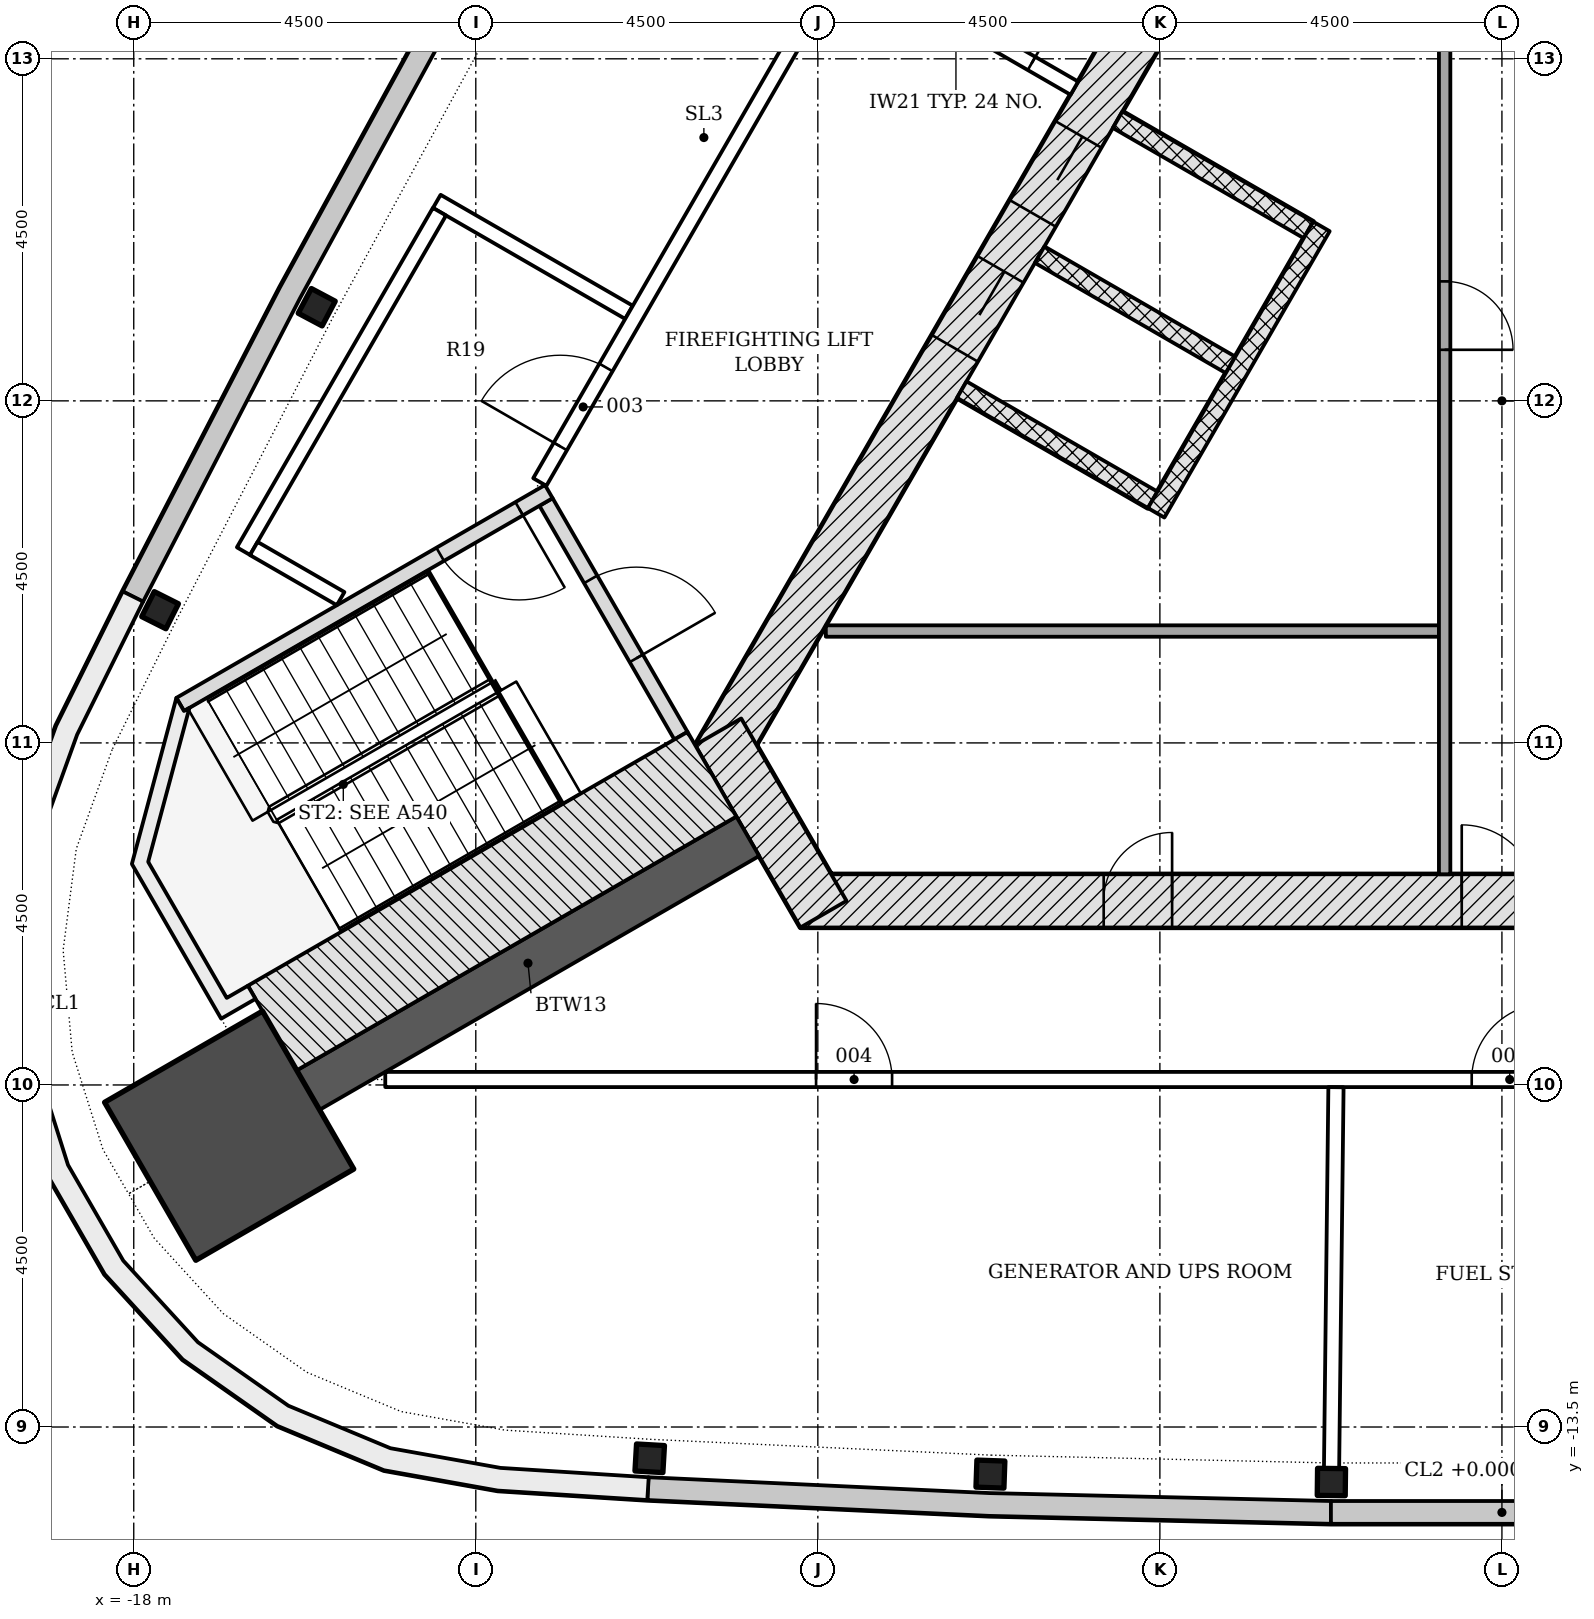
"""IFC4 building model, lengths in metres.
Left out: names, types, materials, properties, quantities, classifications, styles, units other than length and angle.
Written with IfcOpenShell. Run it as: python <this file> out.ifc"""

import sys

from ifc_helpers import new_model, si_unit, direction, frame, frame_2d, origin, origin_2d, place, context, subcontext, project, spatial, polyline, rectangle, i_section, outline, extrude, element, fill, save


model = new_model("IFC4")
c1 = context("Model", 3, precision=1e-05, world=origin(), true_north=direction((0.0, 1.0)))
c2 = subcontext(c1, "Body", "Model", "MODEL_VIEW")
j1 = project(units=[si_unit("LENGTHUNIT", "METRE"), si_unit("PLANEANGLEUNIT", "RADIAN")], contexts=[c1])
p1 = place(None, origin())
s1 = spatial("IfcSite", under=j1, at=p1, CompositionType="ELEMENT")
p2 = place(p1, origin())
s2 = spatial("IfcBuilding", under=s1, at=p2, CompositionType="ELEMENT")
p3 = place(p2, frame((0.0, 0.0, 293.1)))
s3 = spatial("IfcBuildingStorey", under=s2, at=p3, CompositionType="ELEMENT", Elevation=293.1)
p4 = place(p3, frame((-9.229, -6.578, -0.25), z_axis=(0.0, 0.0, 1.0), x_axis=(1.0, 0.0, 0.0)))
e1 = element("IfcWall", 1, at=p4, inside=s3, PredefinedType="SHEAR", context=c2, shape_type="SweptSolid", body=[
    extrude(rectangle(XDim=18.458, YDim=0.7, at=frame_2d((9.229, 0.0))), origin(), (0.0, 0.0, 1.0), 4.5),
])
p5 = place(p4, frame((8.7, 0.0, 0.25)))
e2 = element("IfcOpeningElement", 2, at=p5, cuts=e1, PredefinedType="OPENING", context=c2, shape_type="SweptSolid", body=[
    extrude(rectangle(XDim=1.0, YDim=2.1, at=frame_2d((0.5, 1.05))), frame((0.0, 0.36, 0.0), z_axis=(0.0, -1.0, 0.0), x_axis=(1.0, 0.0, 0.0)), (0.0, 0.0, 1.0), 0.72),
])
p6 = place(p4, frame((3.99, 0.0, 0.25)))
e3 = element("IfcOpeningElement", 3, at=p6, cuts=e1, PredefinedType="OPENING", context=c2, shape_type="SweptSolid", body=[
    extrude(rectangle(XDim=0.9, YDim=2.1, at=frame_2d((0.45, 1.05))), frame((0.0, 0.36, 0.0), z_axis=(0.0, -1.0, 0.0), x_axis=(1.0, 0.0, 0.0)), (0.0, 0.0, 1.0), 0.72),
])
p7 = place(p4, frame((13.539, 0.0, 0.25)))
e4 = element("IfcOpeningElement", 4, at=p7, cuts=e1, PredefinedType="OPENING", context=c2, shape_type="SweptSolid", body=[
    extrude(rectangle(XDim=0.9, YDim=2.1, at=frame_2d((0.45, 1.05))), frame((0.0, 0.36, 0.0), z_axis=(0.0, -1.0, 0.0), x_axis=(1.0, 0.0, 0.0)), (0.0, 0.0, 1.0), 0.72),
])
p8 = place(p3, frame((-1.083, 11.281, -0.25), z_axis=(0.0, 0.0, 1.0), x_axis=(-0.500001446645, -0.866024568562, 0.0)))
e5 = element("IfcWall", 5, at=p8, inside=s3, PredefinedType="SHEAR", context=c2, shape_type="SweptSolid", body=[
    extrude(rectangle(XDim=18.458, YDim=0.7, at=frame_2d((9.229, 0.0))), origin(), (0.0, 0.0, 1.0), 4.5),
])
p9 = place(p8, frame((8.979, 0.0, 0.25)))
e6 = element("IfcOpeningElement", 6, at=p9, cuts=e5, PredefinedType="OPENING", context=c2, shape_type="SweptSolid", body=[
    extrude(rectangle(XDim=1.2, YDim=2.1, at=frame_2d((0.6, 1.05))), frame((0.0, 0.36, 0.0), z_axis=(0.0, -1.0, 0.0), x_axis=(1.0, 0.0, 0.0)), (0.0, 0.0, 1.0), 0.72),
])
p10 = place(p8, frame((11.029, 0.0, 0.25)))
e7 = element("IfcOpeningElement", 7, at=p10, cuts=e5, PredefinedType="OPENING", context=c2, shape_type="SweptSolid", body=[
    extrude(rectangle(XDim=1.2, YDim=2.1, at=frame_2d((0.6, 1.05))), frame((0.0, 0.36, 0.0), z_axis=(0.0, -1.0, 0.0), x_axis=(1.0, 0.0, 0.0)), (0.0, 0.0, 1.0), 0.72),
])
p11 = place(p3, frame((-10.311, -4.353, -0.25), z_axis=(0.0, 0.0, 1.0), x_axis=(0.500042739161, -0.866000726912, 0.0)))
e8 = element("IfcWall", 8, at=p11, inside=s3, PredefinedType="SHEAR", context=c2, shape_type="SweptSolid", body=[
    extrude(rectangle(XDim=2.771, YDim=0.7, at=frame_2d((1.386, 0.0))), origin(), (0.0, 0.0, 1.0), 4.5),
])
p12 = place(p3, frame((-9.922, -5.728, -0.25), z_axis=(0.0, 0.0, 1.0), x_axis=(-0.866032176823, -0.499988268569, 0.0)))
e9 = element("IfcWall", 9, at=p12, inside=s3, PredefinedType="SHEAR", context=c2, shape_type="SweptSolid", body=[
    extrude(rectangle(XDim=6.678, YDim=0.6, at=frame_2d((3.339, 0.0))), origin(), (0.0, 0.0, 1.0), 4.5),
])
p13 = place(p3, frame((-16.745, -9.667, -0.25), z_axis=(0.0, 0.0, 1.0), x_axis=(-0.866025403784, -0.5, 0.0)))
e10 = element("IfcColumn", 10, at=p13, inside=s3, PredefinedType="COLUMN", context=c2, shape_type="SweptSolid", body=[
    extrude(rectangle(XDim=2.4, YDim=2.4, at=origin_2d()), origin(), (0.0, 0.0, 1.0), 4.5),
])
for number, where, z_axis, x_axis in (
    (11, (-15.593, 1.232, -0.25), (0.0, 0.0, 1.0), (-0.47, -0.883, 0.0)),
    (12, (-17.654, -2.754, -0.25), (0.0, 0.0, 1.0), (-0.449, -0.894, 0.0)),
    (13, (-11.212, -13.911, -0.25), (0.0, 0.0, 1.0), (0.998, -0.058, 0.0)),
    (14, (-6.729, -14.119, -0.25), (0.0, 0.0, 1.0), (0.999, -0.035, 0.0)),
    (15, (-2.244, -14.224, -0.25), (0.0, 0.0, 1.0), (1.0, -0.012, 0.0)),
):
    element("IfcColumn", number, at=place(p3, frame(where, z_axis=z_axis, x_axis=x_axis)), inside=s3, PredefinedType="COLUMN", context=c2, shape_type="SweptSolid", body=[
        extrude(i_section(OverallWidth=0.368, OverallDepth=0.356, WebThickness=0.011, FlangeThickness=0.018, FilletRadius=0.015, at=origin_2d()), origin(), (0.0, 0.0, 1.0), 4.5),
    ])
p14 = place(p3, origin())
e16 = element("IfcWall", 16, at=p14, inside=s3, PredefinedType="NOTDEFINED", context=c2, shape_type="SweptSolid", body=[
    extrude(outline(polyline([(-13.919, 5.438), (-16.078, 1.49), (-18.145, -2.507), (-17.878, -2.645), (-15.813, 1.349), (-13.656, 5.294), (-13.919, 5.438)])), origin(), (0.0, 0.0, 1.0), 4.25),
])
p15 = place(p3, origin())
e17 = element("IfcWall", 17, at=p15, inside=s3, PredefinedType="NOTDEFINED", context=c2, shape_type="SweptSolid", body=[
    extrude(outline(polyline([(-11.244, -14.46), (-6.749, -14.669), (-2.25, -14.773), (-2.243, -14.474), (-6.738, -14.369), (-11.23, -14.161), (-11.244, -14.46)])), origin(), (0.0, 0.0, 1.0), 4.25),
])
p16 = place(p3, origin())
e18 = element("IfcWall", 18, at=p16, inside=s3, PredefinedType="NOTDEFINED", context=c2, shape_type="SweptSolid", body=[
    extrude(outline(polyline([(-2.25, -14.773), (2.25, -14.773), (2.25, -14.473), (-2.25, -14.473), (-2.25, -14.773)])), origin(), (0.0, 0.0, 1.0), 1.2),
])
p17 = place(p3, origin())
e19 = element("IfcWall", 19, at=p17, inside=s3, PredefinedType="NOTDEFINED", context=c2, shape_type="SweptSolid", body=[
    extrude(outline(polyline([(-18.145, -2.507), (-19.021, -4.273), (-19.538, -5.703), (-19.733, -7.21), (-19.599, -8.724), (-19.141, -10.174), (-18.381, -11.49), (-17.355, -12.611), (-16.111, -13.485), (-14.708, -14.069), (-13.211, -14.336), (-11.244, -14.46), (-11.225, -14.161), (-13.176, -14.038), (-14.623, -13.779), (-15.965, -13.22), (-17.156, -12.385), (-18.138, -11.312), (-18.865, -10.052), (-19.303, -8.665), (-19.432, -7.216), (-19.244, -5.774), (-18.745, -4.391), (-17.876, -2.64), (-18.145, -2.507)])), origin(), (0.0, 0.0, 1.0), 4.25),
])
for number, where, z_axis, x_axis in (
    (20, (-5.056, 3.699, -0.25), (0.0, 0.0, 1.0), (0.866, -0.5, 0.0)),
    (21, (-6.081, 1.923, -0.25), (0.0, 0.0, 1.0), (0.866, -0.5, 0.0)),
    (22, (-7.106, 0.148, -0.25), (0.0, 0.0, 1.0), (0.866, -0.5, 0.0)),
):
    element("IfcWall", number, at=place(p3, frame(where, z_axis=z_axis, x_axis=x_axis)), inside=s3, PredefinedType="PARTITIONING", context=c2, shape_type="SweptSolid", body=[
        extrude(rectangle(XDim=2.9, YDim=0.25, at=frame_2d((1.45, 0.0))), origin(), (0.0, 0.0, 1.0), 4.5),
    ])
p18 = place(p3, frame((-2.374, 2.294, 0.0), z_axis=(0.0, 0.0, 1.0), x_axis=(-0.499996127374, -0.866027639635, 0.0)))
e23 = element("IfcWall", 23, at=p18, inside=s3, PredefinedType="PARTITIONING", context=c2, shape_type="SweptSolid", body=[
    extrude(rectangle(XDim=4.35, YDim=0.25, at=frame_2d((2.175, 0.0))), origin(), (0.0, 0.0, 1.0), 4.25),
])
p19 = place(p3, frame((-8.895, -3.028, 0.0), z_axis=(0.0, 0.0, 1.0), x_axis=(1.0, 0.0, 0.0)))
e24 = element("IfcWall", 24, at=p19, inside=s3, PredefinedType="PARTITIONING", context=c2, shape_type="SweptSolid", body=[
    extrude(rectangle(XDim=8.066, YDim=0.15, at=frame_2d((4.033, 0.0))), origin(), (0.0, 0.0, 1.0), 4.25),
])
p20 = place(p3, frame((-0.754, 10.756, 0.0), z_axis=(0.0, 0.0, 1.0), x_axis=(0.0, -1.0, 0.0)))
e25 = element("IfcWall", 25, at=p20, inside=s3, PredefinedType="PARTITIONING", context=c2, shape_type="SweptSolid", body=[
    extrude(rectangle(XDim=16.985, YDim=0.15, at=frame_2d((8.492, 0.0))), origin(), (0.0, 0.0, 1.0), 4.25),
])
p21 = place(p20, frame((9.185, 0.0, 0.0)))
e26 = element("IfcOpeningElement", 26, at=p21, cuts=e25, PredefinedType="OPENING", context=c2, shape_type="SweptSolid", body=[
    extrude(rectangle(XDim=0.9, YDim=2.1, at=frame_2d((0.45, 1.05))), frame((0.0, 0.085, 0.0), z_axis=(0.0, -1.0, 0.0), x_axis=(1.0, 0.0, 0.0)), (0.0, 0.0, 1.0), 0.17),
])
p22 = place(p3, frame((-12.576, -1.331, -0.25), z_axis=(0.0, 0.0, 1.0), x_axis=(0.499970499736, -0.8660424351, 0.0)))
e27 = element("IfcWall", 27, at=p22, inside=s3, PredefinedType="SHEAR", context=c2, shape_type="SweptSolid", body=[
    extrude(rectangle(XDim=3.55, YDim=0.2, at=frame_2d((1.775, 0.0))), origin(), (0.0, 0.0, 1.0), 4.5),
])
p23 = place(p22, frame((1.175, 0.0, 0.25)))
e28 = element("IfcOpeningElement", 28, at=p23, cuts=e27, PredefinedType="OPENING", context=c2, shape_type="SweptSolid", body=[
    extrude(rectangle(XDim=1.2, YDim=2.1, at=frame_2d((0.6, 1.05))), frame((0.0, 0.11, 0.0), z_axis=(0.0, -1.0, 0.0), x_axis=(1.0, 0.0, 0.0)), (0.0, 0.0, 1.0), 0.22),
])
p24 = place(p3, frame((-12.539, -1.194, -0.25), z_axis=(0.0, 0.0, 1.0), x_axis=(-0.866045472092, -0.499965239061, 0.0)))
e29 = element("IfcWall", 29, at=p24, inside=s3, PredefinedType="SHEAR", context=c2, shape_type="SweptSolid", body=[
    extrude(rectangle(XDim=5.6, YDim=0.2, at=frame_2d((2.8, 0.0))), origin(), (0.0, 0.0, 1.0), 4.5),
])
p25 = place(p24, frame((0.45, 0.0, 0.25)))
e30 = element("IfcOpeningElement", 30, at=p25, cuts=e29, PredefinedType="OPENING", context=c2, shape_type="SweptSolid", body=[
    extrude(rectangle(XDim=1.2, YDim=2.1, at=frame_2d((0.6, 1.05))), frame((0.0, 0.11, 0.0), z_axis=(0.0, -1.0, 0.0), x_axis=(1.0, 0.0, 0.0)), (0.0, 0.0, 1.0), 0.22),
])
p26 = place(p3, frame((-10.393, -4.912, -0.25), z_axis=(0.0, 0.0, 1.0), x_axis=(-0.866025486527, -0.499999856685, 0.0)))
e31 = element("IfcWall", 31, at=p26, inside=s3, PredefinedType="SHEAR", context=c2, shape_type="SweptSolid", body=[
    extrude(rectangle(XDim=6.679, YDim=1.286, at=frame_2d((3.339, 0.0))), origin(), (0.0, 0.0, 1.0), 4.5),
])
p27 = place(p3, frame((0.0, 0.0, -0.25)))
e32 = element("IfcWall", 32, at=p27, inside=s3, PredefinedType="SHEAR", context=c2, shape_type="SweptSolid", body=[
    extrude(outline(polyline([(-17.439, -3.907), (-18.025, -6.093), (-16.85, -8.128), (-16.398, -7.867), (-16.498, -7.694), (-16.498, -7.694), (-16.777, -7.855), (-17.81, -6.065), (-17.267, -4.039), (-17.339, -4.081), (-17.339, -4.081), (-17.339, -4.081), (-17.339, -4.081), (-17.339, -4.081), (-17.339, -4.081), (-17.339, -4.081), (-17.339, -4.081), (-17.339, -4.081), (-17.339, -4.081), (-17.339, -4.081), (-17.339, -4.081), (-17.339, -4.081), (-17.339, -4.081), (-17.339, -4.081), (-17.339, -4.081), (-17.339, -4.081), (-17.439, -3.907)])), origin(), (0.0, 0.0, 1.0), 4.5),
])
p28 = place(p3, frame((-8.741, 5.913, 0.0), z_axis=(0.0, 0.0, 1.0), x_axis=(0.866017220491, -0.500014173611, 0.0)))
e33 = element("IfcWall", 33, at=p28, inside=s3, PredefinedType="PARTITIONING", context=c2, shape_type="SweptSolid", body=[
    extrude(rectangle(XDim=3.598, YDim=0.2, at=frame_2d((1.799, 0.0))), origin(), (0.0, 0.0, 1.0), 4.25),
])
p29 = place(p28, frame((1.748, 0.0, 0.0)))
e34 = element("IfcOpeningElement", 34, at=p29, cuts=e33, PredefinedType="OPENING", context=c2, shape_type="SweptSolid", body=[
    extrude(rectangle(XDim=1.2, YDim=2.1, at=frame_2d((0.6, 1.05))), frame((0.0, 0.11, 0.0), z_axis=(0.0, -1.0, 0.0), x_axis=(1.0, 0.0, 0.0)), (0.0, 0.0, 1.0), 0.22),
])
p30 = place(p3, frame((-14.013, 2.625, 0.0), z_axis=(0.0, 0.0, 1.0), x_axis=(0.866026830048, -0.499997529631, 0.0)))
e35 = element("IfcWall", 35, at=p30, inside=s3, PredefinedType="PARTITIONING", context=c2, shape_type="SweptSolid", body=[
    extrude(rectangle(XDim=2.919, YDim=0.2, at=frame_2d((1.46, 0.0))), origin(), (0.0, 0.0, 1.0), 4.25),
])
p31 = place(p3, frame((-12.658, -1.068, 0.0), z_axis=(0.0, 0.0, 1.0), x_axis=(0.499996073327, 0.866027670838, 0.0)))
e36 = element("IfcWall", 36, at=p31, inside=s3, PredefinedType="PARTITIONING", context=c2, shape_type="SweptSolid", body=[
    extrude(rectangle(XDim=7.904, YDim=0.2, at=frame_2d((3.952, 0.0))), origin(), (0.0, 0.0, 1.0), 3.702),
])
p32 = place(p31, frame((0.541, 0.0, 0.0)))
e37 = element("IfcOpeningElement", 37, at=p32, cuts=e36, PredefinedType="OPENING", context=c2, shape_type="SweptSolid", body=[
    extrude(rectangle(XDim=1.2, YDim=2.1, at=frame_2d((0.6, 1.05))), frame((0.0, 0.11, 0.0), z_axis=(0.0, -1.0, 0.0), x_axis=(1.0, 0.0, 0.0)), (0.0, 0.0, 1.0), 0.22),
])
p33 = place(p3, frame((-16.556, -1.977, 0.0), z_axis=(0.0, 0.0, 1.0), x_axis=(0.499983365876, 0.866035007288, 0.0)))
e38 = element("IfcWall", 38, at=p33, inside=s3, PredefinedType="PARTITIONING", context=c2, shape_type="SweptSolid", body=[
    extrude(rectangle(XDim=5.157, YDim=0.2, at=frame_2d((2.579, 0.0))), origin(), (0.0, 0.0, 1.0), 3.702),
])
p34 = place(p3, frame((-16.421, -1.942, 0.0), z_axis=(0.0, 0.0, 1.0), x_axis=(0.865991484893, -0.500058744641, 0.0)))
e39 = element("IfcWall", 39, at=p34, inside=s3, PredefinedType="PARTITIONING", context=c2, shape_type="SweptSolid", body=[
    extrude(rectangle(XDim=1.32, YDim=0.2, at=frame_2d((0.66, 0.0))), origin(), (0.0, 0.0, 1.0), 4.25),
])
p35 = place(p3, frame((-14.691, -8.928, 0.0), z_axis=(0.0, 0.0, 1.0), x_axis=(1.0, 0.0, 0.0)))
e40 = element("IfcWall", 40, at=p35, inside=s3, PredefinedType="PARTITIONING", context=c2, shape_type="SweptSolid", body=[
    extrude(rectangle(XDim=19.591, YDim=0.2, at=frame_2d((9.795, 0.0))), origin(), (0.0, 0.0, 1.0), 3.702),
])
p36 = place(p35, frame((5.668, 0.0, 0.0)))
e41 = element("IfcOpeningElement", 41, at=p36, cuts=e40, PredefinedType="OPENING", context=c2, shape_type="SweptSolid", body=[
    extrude(rectangle(XDim=1.0, YDim=2.1, at=frame_2d((0.5, 1.05))), frame((0.0, 0.11, 0.0), z_axis=(0.0, -1.0, 0.0), x_axis=(1.0, 0.0, 0.0)), (0.0, 0.0, 1.0), 0.22),
])
p37 = place(p35, frame((14.293, 0.0, 0.0)))
e42 = element("IfcOpeningElement", 42, at=p37, cuts=e40, PredefinedType="OPENING", context=c2, shape_type="SweptSolid", body=[
    extrude(rectangle(XDim=1.0, YDim=2.1, at=frame_2d((0.5, 1.05))), frame((0.0, 0.11, 0.0), z_axis=(0.0, -1.0, 0.0), x_axis=(1.0, 0.0, 0.0)), (0.0, 0.0, 1.0), 0.22),
])
p38 = place(p35, frame((17.626, 0.0, 0.0)))
e43 = element("IfcOpeningElement", 43, at=p38, cuts=e40, PredefinedType="OPENING", context=c2, shape_type="SweptSolid", body=[
    extrude(rectangle(XDim=1.0, YDim=2.1, at=frame_2d((0.5, 1.05))), frame((0.0, 0.11, 0.0), z_axis=(0.0, -1.0, 0.0), x_axis=(1.0, 0.0, 0.0)), (0.0, 0.0, 1.0), 0.22),
])
p39 = place(p3, frame((-2.242, -14.073, 0.0), z_axis=(0.0, 0.0, 1.0), x_axis=(0.011566914048, 0.999933101012, 0.0)))
e44 = element("IfcWall", 44, at=p39, inside=s3, PredefinedType="PARTITIONING", context=c2, shape_type="SweptSolid", body=[
    extrude(rectangle(XDim=5.044, YDim=0.2, at=frame_2d((2.522, 0.0))), origin(), (0.0, 0.0, 1.0), 3.702),
])
p40 = place(p9, origin())
e45 = element("IfcDoor", 45, at=p40, inside=s3, OperationType="DOUBLE_DOOR_SLIDING", PredefinedType="DOOR", context=c2, shape_type="SweptSolid", body=[
    extrude(rectangle(XDim=1.2, YDim=2.1, at=frame_2d((0.6, 1.05))), frame((0.0, 0.025, 0.0), z_axis=(0.0, -1.0, 0.0), x_axis=(1.0, 0.0, 0.0)), (0.0, 0.0, 1.0), 0.05),
])
fill(e6, e45)
p41 = place(p10, origin())
e46 = element("IfcDoor", 46, at=p41, inside=s3, OperationType="DOUBLE_DOOR_SLIDING", PredefinedType="DOOR", context=c2, shape_type="SweptSolid", body=[
    extrude(rectangle(XDim=1.2, YDim=2.1, at=frame_2d((0.6, 1.05))), frame((0.0, 0.025, 0.0), z_axis=(0.0, -1.0, 0.0), x_axis=(1.0, 0.0, 0.0)), (0.0, 0.0, 1.0), 0.05),
])
fill(e7, e46)
p42 = place(p5, origin())
e47 = element("IfcDoor", 47, at=p42, inside=s3, OperationType="SINGLE_SWING_LEFT", PredefinedType="DOOR", context=c2, shape_type="SweptSolid", body=[
    extrude(rectangle(XDim=1.0, YDim=2.1, at=frame_2d((0.5, 1.05))), frame((0.0, 0.075, 0.0), z_axis=(0.0, -1.0, 0.0), x_axis=(1.0, 0.0, 0.0)), (0.0, 0.0, 1.0), 0.15),
])
fill(e2, e47)
p43 = place(p6, origin())
e48 = element("IfcDoor", 48, at=p43, inside=s3, OperationType="SINGLE_SWING_RIGHT", PredefinedType="DOOR", context=c2, shape_type="SweptSolid", body=[
    extrude(rectangle(XDim=0.9, YDim=2.1, at=frame_2d((0.45, 1.05))), frame((0.0, 0.075, 0.0), z_axis=(0.0, -1.0, 0.0), x_axis=(1.0, 0.0, 0.0)), (0.0, 0.0, 1.0), 0.15),
])
fill(e3, e48)
p44 = place(p21, origin())
e49 = element("IfcDoor", 49, at=p44, inside=s3, OperationType="SINGLE_SWING_RIGHT", PredefinedType="DOOR", context=c2, shape_type="SweptSolid", body=[
    extrude(rectangle(XDim=0.9, YDim=2.1, at=frame_2d((0.45, 1.05))), frame((0.0, 0.025, 0.0), z_axis=(0.0, -1.0, 0.0), x_axis=(1.0, 0.0, 0.0)), (0.0, 0.0, 1.0), 0.05),
])
fill(e26, e49)
p45 = place(p23, origin())
e50 = element("IfcDoor", 50, at=p45, inside=s3, OperationType="SINGLE_SWING_RIGHT", PredefinedType="DOOR", context=c2, shape_type="SweptSolid", body=[
    extrude(rectangle(XDim=1.2, YDim=2.1, at=frame_2d((0.6, 1.05))), frame((0.0, 0.025, 0.0), z_axis=(0.0, -1.0, 0.0), x_axis=(1.0, 0.0, 0.0)), (0.0, 0.0, 1.0), 0.05),
])
fill(e28, e50)
p46 = place(p25, origin())
e51 = element("IfcDoor", 51, at=p46, inside=s3, OperationType="SINGLE_SWING_LEFT", PredefinedType="DOOR", context=c2, shape_type="SweptSolid", body=[
    extrude(rectangle(XDim=1.2, YDim=2.1, at=frame_2d((0.6, 1.05))), frame((0.0, 0.025, 0.0), z_axis=(0.0, -1.0, 0.0), x_axis=(1.0, 0.0, 0.0)), (0.0, 0.0, 1.0), 0.05),
])
fill(e30, e51)
p47 = place(p29, origin())
e52 = element("IfcDoor", 52, at=p47, inside=s3, OperationType="SINGLE_SWING_RIGHT", PredefinedType="DOOR", context=c2, shape_type="SweptSolid", body=[
    extrude(rectangle(XDim=1.2, YDim=2.1, at=frame_2d((0.6, 1.05))), frame((0.0, 0.025, 0.0), z_axis=(0.0, -1.0, 0.0), x_axis=(1.0, 0.0, 0.0)), (0.0, 0.0, 1.0), 0.05),
])
fill(e34, e52)
p48 = place(p32, origin())
e53 = element("IfcDoor", 53, at=p48, inside=s3, OperationType="SINGLE_SWING_LEFT", PredefinedType="DOOR", context=c2, shape_type="SweptSolid", body=[
    extrude(rectangle(XDim=1.2, YDim=2.1, at=frame_2d((0.6, 1.05))), frame((0.0, 0.025, 0.0), z_axis=(0.0, -1.0, 0.0), x_axis=(1.0, 0.0, 0.0)), (0.0, 0.0, 1.0), 0.05),
])
fill(e37, e53)
p49 = place(p36, origin())
e54 = element("IfcDoor", 54, at=p49, inside=s3, OperationType="SINGLE_SWING_LEFT", PredefinedType="DOOR", context=c2, shape_type="SweptSolid", body=[
    extrude(rectangle(XDim=1.0, YDim=2.1, at=frame_2d((0.5, 1.05))), frame((0.0, 0.025, 0.0), z_axis=(0.0, -1.0, 0.0), x_axis=(1.0, 0.0, 0.0)), (0.0, 0.0, 1.0), 0.05),
])
fill(e41, e54)
p50 = place(p37, origin())
e55 = element("IfcDoor", 55, at=p50, inside=s3, OperationType="SINGLE_SWING_RIGHT", PredefinedType="DOOR", context=c2, shape_type="SweptSolid", body=[
    extrude(rectangle(XDim=1.0, YDim=2.1, at=frame_2d((0.5, 1.05))), frame((0.0, 0.025, 0.0), z_axis=(0.0, -1.0, 0.0), x_axis=(1.0, 0.0, 0.0)), (0.0, 0.0, 1.0), 0.05),
])
fill(e42, e55)
save(model, sys.argv[1])
